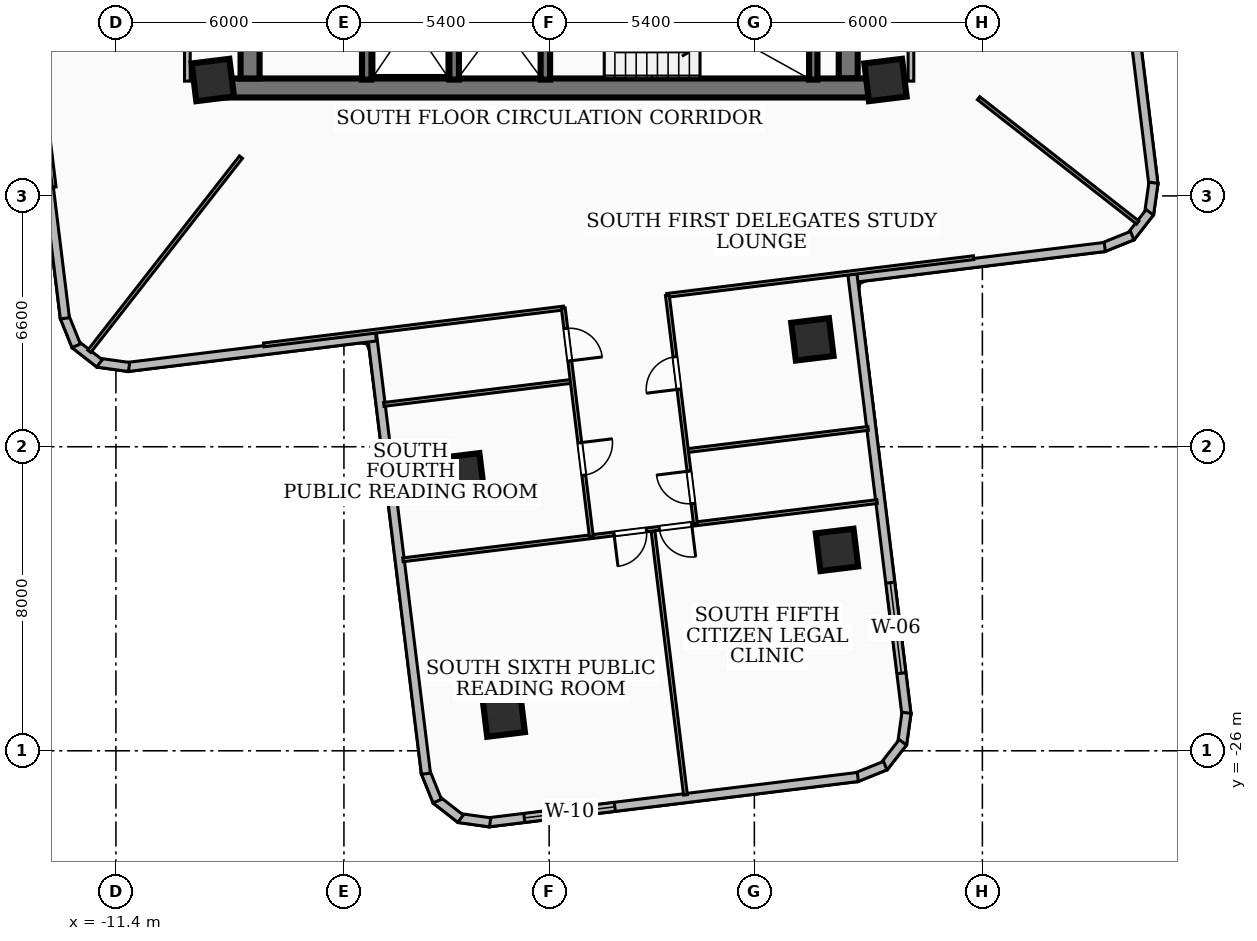
"""IFC4 building model, lengths in metres.
Left out: names, types, materials, properties, quantities, classifications, styles, units other than length and angle.
Written with IfcOpenShell. Run it as: python <this file> out.ifc"""

import sys

from ifc_helpers import new_model, si_unit, direction, frame, frame_2d, origin, origin_2d, place, context, subcontext, project, spatial, rectangle, extrude, element, fill, save


model = new_model("IFC4")
c1 = context("Model", 3, precision=1e-05, world=origin(), true_north=direction((0.0, 1.0)))
c2 = subcontext(c1, "Body", "Model", "MODEL_VIEW")
j1 = project(units=[si_unit("LENGTHUNIT", "METRE"), si_unit("PLANEANGLEUNIT", "RADIAN")], contexts=[c1])
p1 = place(None, origin())
s1 = spatial("IfcSite", under=j1, at=p1, CompositionType="ELEMENT")
p2 = place(p1, origin())
s2 = spatial("IfcBuilding", under=s1, at=p2, CompositionType="ELEMENT")
p3 = place(p2, frame((0.0, 0.0, 78.48)))
s3 = spatial("IfcBuildingStorey", under=s2, at=p3, CompositionType="ELEMENT", Elevation=78.48)
p4 = place(p3, frame((8.78, -8.56, 0.0), z_axis=(0.0, 0.0, 1.0), x_axis=(-1.0, 0.0, 0.0)))
e1 = element("IfcWall", 1, at=p4, inside=s3, PredefinedType="SHEAR", context=c2, shape_type="SweptSolid", body=[
    extrude(rectangle(XDim=17.56, YDim=0.5, at=frame_2d((8.78, 0.0))), origin(), (0.0, 0.0, 1.0), 3.34),
])
for number, where, z_axis, x_axis in (
    (2, (-7.87, -8.31, 0.0), (0.0, 0.0, 1.0), (0.0, 1.0, 0.0)),
    (3, (7.87, -2.0, 0.0), (0.0, 0.0, 1.0), (0.0, -1.0, 0.0)),
):
    element("IfcWall", number, at=place(p3, frame(where, z_axis=z_axis, x_axis=x_axis)), inside=s3, PredefinedType="SHEAR", context=c2, shape_type="SweptSolid", body=[
        extrude(rectangle(XDim=6.31, YDim=0.5, at=frame_2d((3.155, 0.0))), origin(), (0.0, 0.0, 1.0), 3.34),
    ])
p5 = place(p3, frame((6.95, -8.34, 0.0), z_axis=(0.0, 0.0, 1.0), x_axis=(0.0, 1.0, 0.0)))
e4 = element("IfcWall", 4, at=p5, inside=s3, PredefinedType="SOLIDWALL", context=c2, shape_type="SweptSolid", body=[
    extrude(rectangle(XDim=3.06, YDim=0.22, at=frame_2d((1.53, 0.0))), origin(), (0.0, 0.0, 1.0), 3.34),
])
for number, where, z_axis, x_axis in (
    (5, (-0.1, -8.34, 0.0), (0.0, 0.0, 1.0), (0.0, 1.0, 0.0)),
    (6, (-2.5, -8.34, 0.0), (0.0, 0.0, 1.0), (0.0, 1.0, 0.0)),
    (7, (-4.8, -8.34, 0.0), (0.0, 0.0, 1.0), (0.0, 1.0, 0.0)),
):
    element("IfcWall", number, at=place(p3, frame(where, z_axis=z_axis, x_axis=x_axis)), inside=s3, PredefinedType="SOLIDWALL", context=c2, shape_type="SweptSolid", body=[
        extrude(rectangle(XDim=3.04, YDim=0.25, at=frame_2d((1.52, 0.0))), origin(), (0.0, 0.0, 1.0), 3.34),
    ])
for number, where, z_axis, x_axis in (
    (8, (8.85, -8.35, 0.0), (0.0, 0.0, 1.0), (0.993, 0.122, 0.0)),
    (9, (-8.85, -8.35, 0.0), (0.0, 0.0, 1.0), (0.993, 0.122, 0.0)),
    (10, (-2.271, -18.724, 0.0), (0.0, 0.0, 1.0), (0.993, 0.122, 0.0)),
    (11, (6.927, -15.175, 0.0), (0.0, 0.0, 1.0), (0.993, 0.122, 0.0)),
    (12, (-1.195, -25.074, 0.0), (0.0, 0.0, 1.0), (0.993, 0.122, 0.0)),
    (13, (7.574, -20.714, 0.0), (0.0, 0.0, 1.0), (0.993, 0.122, 0.0)),
):
    element("IfcColumn", number, at=place(p3, frame(where, z_axis=z_axis, x_axis=x_axis)), inside=s3, PredefinedType="COLUMN", context=c2, shape_type="SweptSolid", body=[
        extrude(rectangle(XDim=1.0, YDim=1.0, at=origin_2d()), origin(), (0.0, 0.0, 1.0), 3.6),
    ])
p6 = place(p3, frame((15.098, -4.558, 0.0), z_axis=(0.0, 0.0, 1.0), x_axis=(0.121938646341, -0.992537639855, 0.0)))
e14 = element("IfcWall", 14, at=p6, inside=s3, PredefinedType="SOLIDWALL", context=c2, shape_type="SweptSolid", body=[
    extrude(rectangle(XDim=6.595, YDim=0.24, at=frame_2d((3.298, 0.0))), origin(), (0.0, 0.0, 1.0), 3.34),
])
p7 = place(p3, frame((15.902, -11.054, 0.0), z_axis=(0.0, 0.0, 1.0), x_axis=(-0.138376981782, -0.990379629694, 0.0)))
e15 = element("IfcWall", 15, at=p7, inside=s3, PredefinedType="SOLIDWALL", context=c2, shape_type="SweptSolid", body=[
    extrude(rectangle(XDim=0.831, YDim=0.24, at=frame_2d((0.416, 0.0))), origin(), (0.0, 0.0, 1.0), 3.34),
])
p8 = place(p3, frame((15.805, -11.832, 0.0), z_axis=(0.0, 0.0, 1.0), x_axis=(-0.614397431824, -0.788996702001, 0.0)))
e16 = element("IfcWall", 16, at=p8, inside=s3, PredefinedType="SOLIDWALL", context=c2, shape_type="SweptSolid", body=[
    extrude(rectangle(XDim=0.814, YDim=0.24, at=frame_2d((0.407, 0.0))), origin(), (0.0, 0.0, 1.0), 3.34),
])
p9 = place(p3, frame((15.343, -12.445, 0.0), z_axis=(0.0, 0.0, 1.0), x_axis=(-0.927724225254, -0.37326634174, 0.0)))
e17 = element("IfcWall", 17, at=p9, inside=s3, PredefinedType="SOLIDWALL", context=c2, shape_type="SweptSolid", body=[
    extrude(rectangle(XDim=0.83, YDim=0.24, at=frame_2d((0.415, 0.0))), origin(), (0.0, 0.0, 1.0), 3.34),
])
p10 = place(p3, frame((14.621, -12.743, 0.0), z_axis=(0.0, 0.0, 1.0), x_axis=(-0.992536263595, -0.121949848087, 0.0)))
e18 = element("IfcWall", 18, at=p10, inside=s3, PredefinedType="SOLIDWALL", context=c2, shape_type="SweptSolid", body=[
    extrude(rectangle(XDim=6.775, YDim=0.24, at=frame_2d((3.387, 0.0))), origin(), (0.0, 0.0, 1.0), 3.34),
])
p11 = place(p3, frame((7.98, -13.462, 0.0), z_axis=(0.0, 0.0, 1.0), x_axis=(0.121890578705, -0.992543544044, 0.0)))
e19 = element("IfcWall", 19, at=p11, inside=s3, PredefinedType="SOLIDWALL", context=c2, shape_type="SweptSolid", body=[
    extrude(rectangle(XDim=11.675, YDim=0.24, at=frame_2d((5.838, 0.0))), origin(), (0.0, 0.0, 1.0), 3.34),
])
p12 = place(p11, frame((8.175, 0.0, 0.85)))
e20 = element("IfcOpeningElement", 20, at=p12, cuts=e19, PredefinedType="OPENING", context=c2, shape_type="SweptSolid", body=[
    extrude(rectangle(XDim=2.4, YDim=1.85, at=frame_2d((1.2, 0.925))), frame((0.0, 0.13, 0.0), z_axis=(0.0, -1.0, 0.0), x_axis=(1.0, 0.0, 0.0)), (0.0, 0.0, 1.0), 0.26),
])
p13 = place(p3, frame((9.403, -25.0, 0.0), z_axis=(0.0, 0.0, 1.0), x_axis=(-0.138376981782, -0.990379629694, 0.0)))
e21 = element("IfcWall", 21, at=p13, inside=s3, PredefinedType="SOLIDWALL", context=c2, shape_type="SweptSolid", body=[
    extrude(rectangle(XDim=0.831, YDim=0.24, at=frame_2d((0.416, 0.0))), origin(), (0.0, 0.0, 1.0), 3.34),
])
p14 = place(p3, frame((9.306, -25.778, 0.0), z_axis=(0.0, 0.0, 1.0), x_axis=(-0.614542882467, -0.788883416995, 0.0)))
e22 = element("IfcWall", 22, at=p14, inside=s3, PredefinedType="SOLIDWALL", context=c2, shape_type="SweptSolid", body=[
    extrude(rectangle(XDim=0.814, YDim=0.24, at=frame_2d((0.407, 0.0))), origin(), (0.0, 0.0, 1.0), 3.34),
])
p15 = place(p3, frame((8.844, -26.391, 0.0), z_axis=(0.0, 0.0, 1.0), x_axis=(-0.92756002783, -0.37367418264, 0.0)))
e23 = element("IfcWall", 23, at=p15, inside=s3, PredefinedType="SOLIDWALL", context=c2, shape_type="SweptSolid", body=[
    extrude(rectangle(XDim=0.829, YDim=0.24, at=frame_2d((0.415, 0.0))), origin(), (0.0, 0.0, 1.0), 3.34),
])
p16 = place(p3, frame((8.123, -26.689, 0.0), z_axis=(0.0, 0.0, 1.0), x_axis=(-0.992547632308, -0.12185728374, 0.0)))
e24 = element("IfcWall", 24, at=p16, inside=s3, PredefinedType="SOLIDWALL", context=c2, shape_type="SweptSolid", body=[
    extrude(rectangle(XDim=9.799, YDim=0.24, at=frame_2d((4.899, 0.0))), origin(), (0.0, 0.0, 1.0), 3.34),
])
p17 = place(p16, frame((6.443, 0.0, 0.85)))
e25 = element("IfcOpeningElement", 25, at=p17, cuts=e24, PredefinedType="OPENING", context=c2, shape_type="SweptSolid", body=[
    extrude(rectangle(XDim=2.4, YDim=1.65, at=frame_2d((1.2, 0.825))), frame((0.0, 0.13, 0.0), z_axis=(0.0, -1.0, 0.0), x_axis=(1.0, 0.0, 0.0)), (0.0, 0.0, 1.0), 0.26),
])
p18 = place(p3, frame((-1.553, -27.883, 0.0), z_axis=(0.0, 0.0, 1.0), x_axis=(-0.990540037659, 0.137224027762, 0.0)))
e26 = element("IfcWall", 26, at=p18, inside=s3, PredefinedType="SOLIDWALL", context=c2, shape_type="SweptSolid", body=[
    extrude(rectangle(XDim=0.831, YDim=0.24, at=frame_2d((0.416, 0.0))), origin(), (0.0, 0.0, 1.0), 3.34),
])
p19 = place(p3, frame((-2.331, -27.787, 0.0), z_axis=(0.0, 0.0, 1.0), x_axis=(-0.788156162836, 0.615475314683, 0.0)))
e27 = element("IfcWall", 27, at=p19, inside=s3, PredefinedType="SOLIDWALL", context=c2, shape_type="SweptSolid", body=[
    extrude(rectangle(XDim=0.814, YDim=0.24, at=frame_2d((0.407, 0.0))), origin(), (0.0, 0.0, 1.0), 3.34),
])
p20 = place(p3, frame((-2.944, -27.324, 0.0), z_axis=(0.0, 0.0, 1.0), x_axis=(-0.37367418264, 0.92756002783, 0.0)))
e28 = element("IfcWall", 28, at=p20, inside=s3, PredefinedType="SOLIDWALL", context=c2, shape_type="SweptSolid", body=[
    extrude(rectangle(XDim=0.829, YDim=0.24, at=frame_2d((0.415, 0.0))), origin(), (0.0, 0.0, 1.0), 3.34),
])
p21 = place(p3, frame((-3.242, -26.603, 0.0), z_axis=(0.0, 0.0, 1.0), x_axis=(-0.121890578705, 0.992543544044, 0.0)))
e29 = element("IfcWall", 29, at=p21, inside=s3, PredefinedType="SOLIDWALL", context=c2, shape_type="SweptSolid", body=[
    extrude(rectangle(XDim=11.675, YDim=0.24, at=frame_2d((5.838, 0.0))), origin(), (0.0, 0.0, 1.0), 2.486),
])
p22 = place(p3, frame((-4.558, -15.098, 0.0), z_axis=(0.0, 0.0, 1.0), x_axis=(-0.992537639855, -0.121938646341, 0.0)))
e30 = element("IfcWall", 30, at=p22, inside=s3, PredefinedType="SOLIDWALL", context=c2, shape_type="SweptSolid", body=[
    extrude(rectangle(XDim=6.595, YDim=0.24, at=frame_2d((3.298, 0.0))), origin(), (0.0, 0.0, 1.0), 2.486),
])
p23 = place(p3, frame((-11.054, -15.902, 0.0), z_axis=(0.0, 0.0, 1.0), x_axis=(-0.990379629694, 0.138376981782, 0.0)))
e31 = element("IfcWall", 31, at=p23, inside=s3, PredefinedType="SOLIDWALL", context=c2, shape_type="SweptSolid", body=[
    extrude(rectangle(XDim=0.831, YDim=0.24, at=frame_2d((0.416, 0.0))), origin(), (0.0, 0.0, 1.0), 3.34),
])
p24 = place(p3, frame((-11.832, -15.805, 0.0), z_axis=(0.0, 0.0, 1.0), x_axis=(-0.788996702001, 0.614397431824, 0.0)))
e32 = element("IfcWall", 32, at=p24, inside=s3, PredefinedType="SOLIDWALL", context=c2, shape_type="SweptSolid", body=[
    extrude(rectangle(XDim=0.814, YDim=0.24, at=frame_2d((0.407, 0.0))), origin(), (0.0, 0.0, 1.0), 3.34),
])
p25 = place(p3, frame((-12.445, -15.343, 0.0), z_axis=(0.0, 0.0, 1.0), x_axis=(-0.37326634174, 0.927724225254, 0.0)))
e33 = element("IfcWall", 33, at=p25, inside=s3, PredefinedType="SOLIDWALL", context=c2, shape_type="SweptSolid", body=[
    extrude(rectangle(XDim=0.83, YDim=0.24, at=frame_2d((0.415, 0.0))), origin(), (0.0, 0.0, 1.0), 3.34),
])
p26 = place(p3, frame((-12.743, -14.621, 0.0), z_axis=(0.0, 0.0, 1.0), x_axis=(-0.121949848087, 0.992536263595, 0.0)))
e34 = element("IfcWall", 34, at=p26, inside=s3, PredefinedType="SOLIDWALL", context=c2, shape_type="SweptSolid", body=[
    extrude(rectangle(XDim=6.775, YDim=0.24, at=frame_2d((3.387, 0.0))), origin(), (0.0, 0.0, 1.0), 2.644),
])
for number, where, z_axis, x_axis in (
    (35, (-9.52, -8.38, 0.0), (0.0, 0.0, 1.0), (0.0, 1.0, 0.0)),
    (36, (9.52, -8.38, 0.0), (0.0, 0.0, 1.0), (0.0, 1.0, 0.0)),
):
    element("IfcWall", number, at=place(p3, frame(where, z_axis=z_axis, x_axis=x_axis)), inside=s3, PredefinedType="PARTITIONING", context=c2, shape_type="SweptSolid", body=[
        extrude(rectangle(XDim=6.63, YDim=0.15, at=frame_2d((3.315, 0.0))), origin(), (0.0, 0.0, 1.0), 2.486),
    ])
p27 = place(p3, frame((-8.11, -10.38, 0.0), z_axis=(0.0, 0.0, 1.0), x_axis=(-0.615665236773, -0.788007814828, 0.0)))
e37 = element("IfcWall", 37, at=p27, inside=s3, PredefinedType="PARTITIONING", context=c2, shape_type="SweptSolid", body=[
    extrude(rectangle(XDim=6.482, YDim=0.1, at=frame_2d((3.241, 0.0))), origin(), (0.0, 0.0, 1.0), 2.644),
])
p28 = place(p3, frame((11.3, -8.829, 0.0), z_axis=(0.0, 0.0, 1.0), x_axis=(0.788014623364, -0.61565652223, 0.0)))
e38 = element("IfcWall", 38, at=p28, inside=s3, PredefinedType="PARTITIONING", context=c2, shape_type="SweptSolid", body=[
    extrude(rectangle(XDim=5.315, YDim=0.1, at=frame_2d((2.657, 0.0))), origin(), (0.0, 0.0, 1.0), 3.34),
])
for number, where, z_axis, x_axis in (
    (39, (-14.017, -3.101, 0.0), (0.0, 0.0, 1.0), (0.122, -0.993, 0.0)),
    (40, (3.101, -14.017, 0.0), (0.0, 0.0, 1.0), (0.993, 0.122, 0.0)),
):
    element("IfcWall", number, at=place(p3, frame(where, z_axis=z_axis, x_axis=x_axis)), inside=s3, PredefinedType="PARTITIONING", context=c2, shape_type="SweptSolid", body=[
        extrude(rectangle(XDim=8.13, YDim=0.1, at=frame_2d((4.065, 0.0))), origin(), (0.0, 0.0, 1.0), 2.486),
    ])
p29 = place(p3, frame((-7.509, -15.32, 0.0), z_axis=(0.0, 0.0, 1.0), x_axis=(0.992529957607, 0.122001160868, 0.0)))
e41 = element("IfcWall", 41, at=p29, inside=s3, PredefinedType="PARTITIONING", context=c2, shape_type="SweptSolid", body=[
    extrude(rectangle(XDim=7.95, YDim=0.1, at=frame_2d((3.975, 0.0))), origin(), (0.0, 0.0, 1.0), 2.486),
])
p30 = place(p3, frame((3.633, -18.102, 0.0), z_axis=(0.0, 0.0, 1.0), x_axis=(0.992555014783, 0.121797137196, 0.0)))
e42 = element("IfcWall", 42, at=p30, inside=s3, PredefinedType="PARTITIONING", context=c2, shape_type="SweptSolid", body=[
    extrude(rectangle(XDim=4.795, YDim=0.1, at=frame_2d((2.397, 0.0))), origin(), (0.0, 0.0, 1.0), 2.486),
])
p31 = place(p3, frame((-4.35, -16.886, 0.0), z_axis=(0.0, 0.0, 1.0), x_axis=(0.992554700093, 0.121799701653, 0.0)))
e43 = element("IfcWall", 43, at=p31, inside=s3, PredefinedType="PARTITIONING", context=c2, shape_type="SweptSolid", body=[
    extrude(rectangle(XDim=4.975, YDim=0.1, at=frame_2d((2.488, 0.0))), origin(), (0.0, 0.0, 1.0), 2.486),
])
p32 = place(p3, frame((3.85, -20.03, 0.0), z_axis=(0.0, 0.0, 1.0), x_axis=(-0.121942127656, 0.99253721215, 0.0)))
e44 = element("IfcWall", 44, at=p32, inside=s3, PredefinedType="PARTITIONING", context=c2, shape_type="SweptSolid", body=[
    extrude(rectangle(XDim=6.06, YDim=0.1, at=frame_2d((3.03, 0.0))), origin(), (0.0, 0.0, 1.0), 3.34),
])
p33 = place(p32, frame((3.57, 0.0, 0.0)))
e45 = element("IfcOpeningElement", 45, at=p33, cuts=e44, PredefinedType="OPENING", context=c2, shape_type="SweptSolid", body=[
    extrude(rectangle(XDim=0.86, YDim=2.04, at=frame_2d((0.43, 1.02))), frame((0.0, 0.06, 0.0), z_axis=(0.0, -1.0, 0.0), x_axis=(1.0, 0.0, 0.0)), (0.0, 0.0, 1.0), 0.12),
])
p34 = place(p32, frame((0.54, 0.0, 0.0)))
e46 = element("IfcOpeningElement", 46, at=p34, cuts=e44, PredefinedType="OPENING", context=c2, shape_type="SweptSolid", body=[
    extrude(rectangle(XDim=0.86, YDim=2.04, at=frame_2d((0.43, 1.02))), frame((0.0, 0.06, 0.0), z_axis=(0.0, -1.0, 0.0), x_axis=(1.0, 0.0, 0.0)), (0.0, 0.0, 1.0), 0.12),
])
p35 = place(p3, frame((0.372, -14.352, 0.0), z_axis=(0.0, 0.0, 1.0), x_axis=(0.121807732679, -0.992553714546, 0.0)))
e47 = element("IfcWall", 47, at=p35, inside=s3, PredefinedType="PARTITIONING", context=c2, shape_type="SweptSolid", body=[
    extrude(rectangle(XDim=6.059, YDim=0.1, at=frame_2d((3.03, 0.0))), origin(), (0.0, 0.0, 1.0), 3.34),
])
p36 = place(p35, frame((0.54, 0.0, 0.0)))
e48 = element("IfcOpeningElement", 48, at=p36, cuts=e47, PredefinedType="OPENING", context=c2, shape_type="SweptSolid", body=[
    extrude(rectangle(XDim=0.86, YDim=2.04, at=frame_2d((0.43, 1.02))), frame((0.0, 0.06, 0.0), z_axis=(0.0, -1.0, 0.0), x_axis=(1.0, 0.0, 0.0)), (0.0, 0.0, 1.0), 0.12),
])
p37 = place(p35, frame((3.57, 0.0, 0.0)))
e49 = element("IfcOpeningElement", 49, at=p37, cuts=e47, PredefinedType="OPENING", context=c2, shape_type="SweptSolid", body=[
    extrude(rectangle(XDim=0.86, YDim=2.04, at=frame_2d((0.43, 1.02))), frame((0.0, 0.06, 0.0), z_axis=(0.0, -1.0, 0.0), x_axis=(1.0, 0.0, 0.0)), (0.0, 0.0, 1.0), 0.12),
])
p38 = place(p3, frame((2.735, -20.227, 0.0), z_axis=(0.0, 0.0, 1.0), x_axis=(0.121948085338, -0.992536480177, 0.0)))
e50 = element("IfcWall", 50, at=p38, inside=s3, PredefinedType="PARTITIONING", context=c2, shape_type="SweptSolid", body=[
    extrude(rectangle(XDim=6.985, YDim=0.1, at=frame_2d((3.493, 0.0))), origin(), (0.0, 0.0, 1.0), 2.793),
])
p39 = place(p3, frame((8.629, -19.443, 0.0), z_axis=(0.0, 0.0, 1.0), x_axis=(-0.992544774441, -0.121880559277, 0.0)))
e51 = element("IfcWall", 51, at=p39, inside=s3, PredefinedType="PARTITIONING", context=c2, shape_type="SweptSolid", body=[
    extrude(rectangle(XDim=12.57, YDim=0.1, at=frame_2d((6.285, 0.0))), origin(), (0.0, 0.0, 1.0), 2.486),
])
p40 = place(p39, frame((6.115, 0.0, 0.0)))
e52 = element("IfcOpeningElement", 52, at=p40, cuts=e51, PredefinedType="OPENING", context=c2, shape_type="SweptSolid", body=[
    extrude(rectangle(XDim=0.86, YDim=2.04, at=frame_2d((0.43, 1.02))), frame((0.0, 0.06, 0.0), z_axis=(0.0, -1.0, 0.0), x_axis=(1.0, 0.0, 0.0)), (0.0, 0.0, 1.0), 0.12),
])
p41 = place(p39, frame((4.915, 0.0, 0.0)))
e53 = element("IfcOpeningElement", 53, at=p41, cuts=e51, PredefinedType="OPENING", context=c2, shape_type="SweptSolid", body=[
    extrude(rectangle(XDim=0.86, YDim=2.04, at=frame_2d((0.43, 1.02))), frame((0.0, 0.06, 0.0), z_axis=(0.0, -1.0, 0.0), x_axis=(1.0, 0.0, 0.0)), (0.0, 0.0, 1.0), 0.12),
])
p42 = place(p12, origin())
e54 = element("IfcWindow", 54, at=p42, inside=s3, PartitioningType="SINGLE_PANEL", PredefinedType="WINDOW", context=c2, shape_type="SweptSolid", body=[
    extrude(rectangle(XDim=2.4, YDim=1.85, at=frame_2d((1.2, 0.925))), frame((0.0, 0.03, 0.0), z_axis=(0.0, -1.0, 0.0), x_axis=(1.0, 0.0, 0.0)), (0.0, 0.0, 1.0), 0.06),
])
fill(e20, e54)
p43 = place(p17, origin())
e55 = element("IfcWindow", 55, at=p43, inside=s3, PartitioningType="SINGLE_PANEL", PredefinedType="WINDOW", context=c2, shape_type="SweptSolid", body=[
    extrude(rectangle(XDim=2.4, YDim=1.65, at=frame_2d((1.2, 0.825))), frame((0.0, 0.03, 0.0), z_axis=(0.0, -1.0, 0.0), x_axis=(1.0, 0.0, 0.0)), (0.0, 0.0, 1.0), 0.06),
])
fill(e25, e55)
p44 = place(p33, origin())
e56 = element("IfcDoor", 56, at=p44, inside=s3, OperationType="SINGLE_SWING_LEFT", PredefinedType="DOOR", context=c2, shape_type="SweptSolid", body=[
    extrude(rectangle(XDim=0.86, YDim=2.04, at=frame_2d((0.43, 1.02))), frame((0.0, 0.025, 0.0), z_axis=(0.0, -1.0, 0.0), x_axis=(1.0, 0.0, 0.0)), (0.0, 0.0, 1.0), 0.05),
])
fill(e45, e56)
p45 = place(p34, origin())
e57 = element("IfcDoor", 57, at=p45, inside=s3, OperationType="SINGLE_SWING_RIGHT", PredefinedType="DOOR", context=c2, shape_type="SweptSolid", body=[
    extrude(rectangle(XDim=0.86, YDim=2.04, at=frame_2d((0.43, 1.02))), frame((0.0, 0.025, 0.0), z_axis=(0.0, -1.0, 0.0), x_axis=(1.0, 0.0, 0.0)), (0.0, 0.0, 1.0), 0.05),
])
fill(e46, e57)
p46 = place(p36, origin())
e58 = element("IfcDoor", 58, at=p46, inside=s3, OperationType="SINGLE_SWING_RIGHT", PredefinedType="DOOR", context=c2, shape_type="SweptSolid", body=[
    extrude(rectangle(XDim=0.86, YDim=2.04, at=frame_2d((0.43, 1.02))), frame((0.0, 0.025, 0.0), z_axis=(0.0, -1.0, 0.0), x_axis=(1.0, 0.0, 0.0)), (0.0, 0.0, 1.0), 0.05),
])
fill(e48, e58)
p47 = place(p37, origin())
e59 = element("IfcDoor", 59, at=p47, inside=s3, OperationType="SINGLE_SWING_LEFT", PredefinedType="DOOR", context=c2, shape_type="SweptSolid", body=[
    extrude(rectangle(XDim=0.86, YDim=2.04, at=frame_2d((0.43, 1.02))), frame((0.0, 0.025, 0.0), z_axis=(0.0, -1.0, 0.0), x_axis=(1.0, 0.0, 0.0)), (0.0, 0.0, 1.0), 0.05),
])
fill(e49, e59)
p48 = place(p40, origin())
e60 = element("IfcDoor", 60, at=p48, inside=s3, OperationType="SINGLE_SWING_RIGHT", PredefinedType="DOOR", context=c2, shape_type="SweptSolid", body=[
    extrude(rectangle(XDim=0.86, YDim=2.04, at=frame_2d((0.43, 1.02))), frame((0.0, 0.025, 0.0), z_axis=(0.0, -1.0, 0.0), x_axis=(1.0, 0.0, 0.0)), (0.0, 0.0, 1.0), 0.05),
])
fill(e52, e60)
p49 = place(p41, origin())
e61 = element("IfcDoor", 61, at=p49, inside=s3, OperationType="SINGLE_SWING_LEFT", PredefinedType="DOOR", context=c2, shape_type="SweptSolid", body=[
    extrude(rectangle(XDim=0.86, YDim=2.04, at=frame_2d((0.43, 1.02))), frame((0.0, 0.025, 0.0), z_axis=(0.0, -1.0, 0.0), x_axis=(1.0, 0.0, 0.0)), (0.0, 0.0, 1.0), 0.05),
])
fill(e53, e61)
save(model, sys.argv[1])
